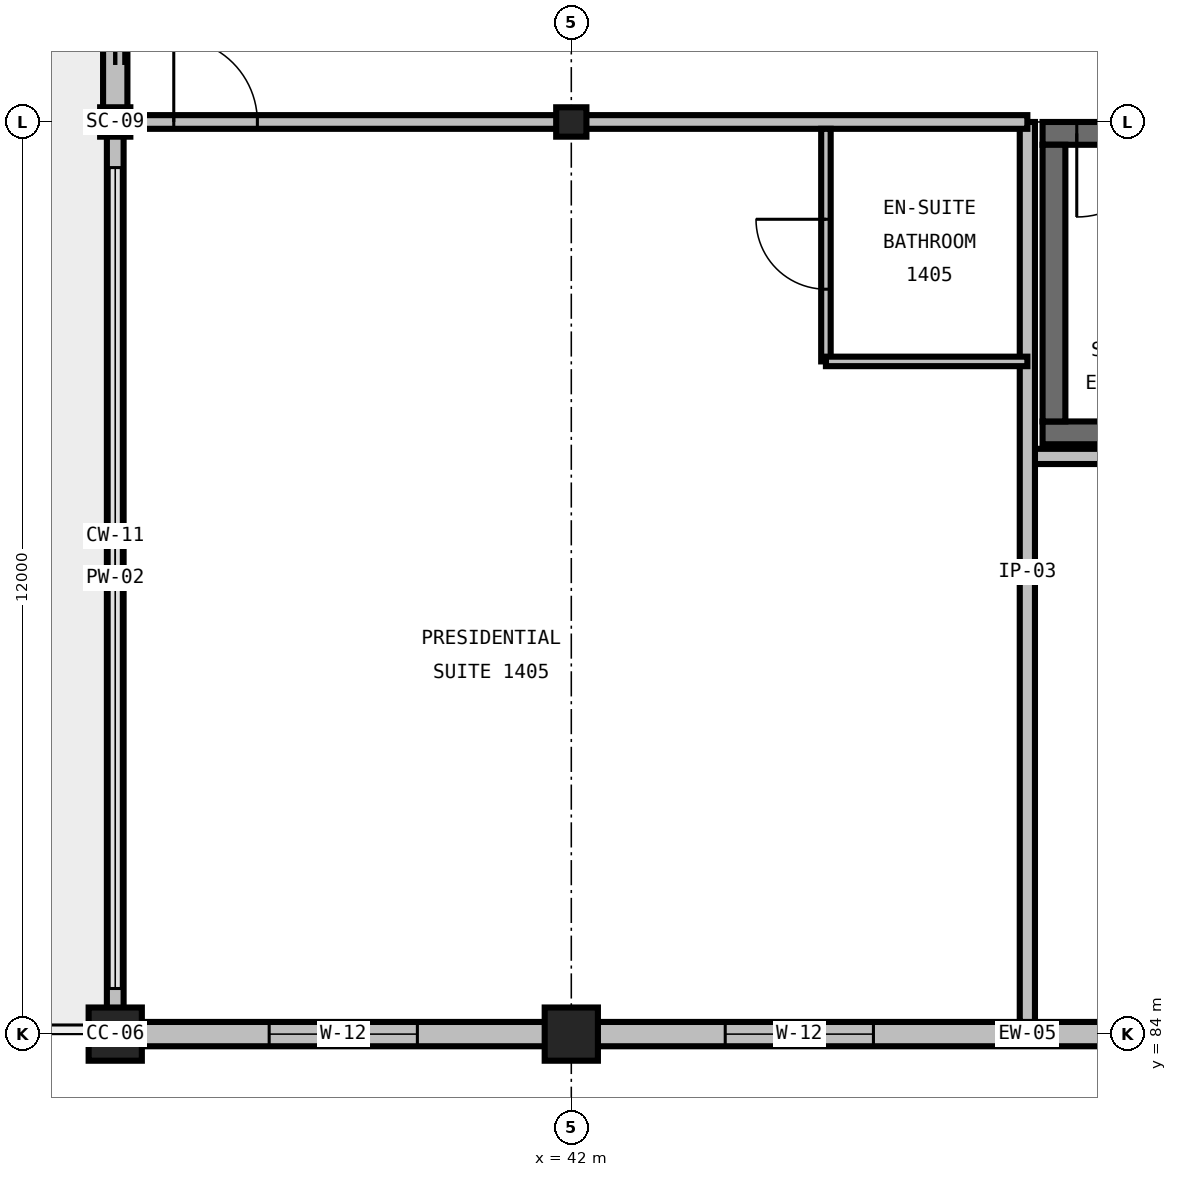
"""IFC4 building model, lengths in metres.
Left out: names, types, materials, properties, quantities, classifications, styles, units other than length and angle.
Written with IfcOpenShell. Run it as: python <this file> out.ifc"""

import sys

from ifc_helpers import new_model, si_unit, direction, frame, frame_2d, origin, origin_2d, place, context, subcontext, project, spatial, rectangle, i_section, extrude, element, fill, save


model = new_model("IFC4")
c1 = context("Model", 3, precision=1e-05, world=origin(), true_north=direction((0.0, 1.0)))
c2 = subcontext(c1, "Body", "Model", "MODEL_VIEW")
j1 = project(units=[si_unit("LENGTHUNIT", "METRE"), si_unit("PLANEANGLEUNIT", "RADIAN")], contexts=[c1])
p1 = place(None, origin())
s1 = spatial("IfcSite", under=j1, at=p1, CompositionType="ELEMENT")
p2 = place(p1, origin())
s2 = spatial("IfcBuilding", under=s1, at=p2, CompositionType="ELEMENT")
p3 = place(p2, frame((0.0, 0.0, 60.0)))
s3 = spatial("IfcBuildingStorey", under=s2, at=p3, CompositionType="ELEMENT", Elevation=60.0)
p4 = place(p3, frame((36.0, 84.0, 0.0), z_axis=(0.0, 0.0, 1.0), x_axis=(1.0, 0.0, 0.0)))
e1 = element("IfcColumn", 1, at=p4, inside=s3, PredefinedType="COLUMN", context=c2, shape_type="SweptSolid", body=[
    extrude(rectangle(XDim=0.7, YDim=0.7, at=origin_2d()), origin(), (0.0, 0.0, 1.0), 3.6),
])
p5 = place(p3, frame((36.0, 96.0, 0.0), z_axis=(0.0, 0.0, 1.0), x_axis=(1.0, 0.0, 0.0)))
e2 = element("IfcColumn", 2, at=p5, inside=s3, PredefinedType="COLUMN", context=c2, shape_type="SweptSolid", body=[
    extrude(i_section(OverallWidth=0.398, OverallDepth=0.387, WebThickness=0.021, FlangeThickness=0.033, FilletRadius=0.031, at=origin_2d()), origin(), (0.0, 0.0, 1.0), 3.6),
])
p6 = place(p3, frame((42.0, 84.0, 0.0), z_axis=(0.0, 0.0, 1.0), x_axis=(1.0, 0.0, 0.0)))
e3 = element("IfcColumn", 3, at=p6, inside=s3, PredefinedType="COLUMN", context=c2, shape_type="SweptSolid", body=[
    extrude(rectangle(XDim=0.7, YDim=0.7, at=origin_2d()), origin(), (0.0, 0.0, 1.0), 3.6),
])
p7 = place(p3, frame((42.0, 96.0, 0.0), z_axis=(0.0, 0.0, 1.0), x_axis=(1.0, 0.0, 0.0)))
e4 = element("IfcColumn", 4, at=p7, inside=s3, PredefinedType="COLUMN", context=c2, shape_type="SweptSolid", body=[
    extrude(i_section(OverallWidth=0.398, OverallDepth=0.387, WebThickness=0.021, FlangeThickness=0.033, FilletRadius=0.031, at=origin_2d()), origin(), (0.0, 0.0, 1.0), 3.6),
])
p8 = place(p3, frame((48.2, 91.91, 0.0), z_axis=(0.0, 0.0, 1.0), x_axis=(1.0, 0.0, 0.0)))
e5 = element("IfcWall", 5, at=p8, inside=s3, PredefinedType="SHEAR", context=c2, shape_type="SweptSolid", body=[
    extrude(rectangle(XDim=9.8, YDim=0.3, at=frame_2d((4.9, 0.0))), origin(), (0.0, 0.0, 1.0), 3.6),
])
p9 = place(p3, frame((58.0, 95.85, 0.0), z_axis=(0.0, 0.0, 1.0), x_axis=(-1.0, 0.0, 0.0)))
e6 = element("IfcWall", 6, at=p9, inside=s3, PredefinedType="SHEAR", context=c2, shape_type="SweptSolid", body=[
    extrude(rectangle(XDim=9.8, YDim=0.3, at=frame_2d((4.9, 0.0))), origin(), (0.0, 0.0, 1.0), 3.6),
])
p10 = place(p9, frame((8.25, 0.0, 0.0)))
e7 = element("IfcOpeningElement", 7, at=p10, cuts=e6, PredefinedType="OPENING", context=c2, shape_type="SweptSolid", body=[
    extrude(rectangle(XDim=1.1, YDim=2.2, at=frame_2d((0.55, 1.1))), frame((0.0, 0.165, 0.0), z_axis=(0.0, -1.0, 0.0), x_axis=(1.0, 0.0, 0.0)), (0.0, 0.0, 1.0), 0.33),
])
p11 = place(p3, frame((48.35, 95.7, 0.0), z_axis=(0.0, 0.0, 1.0), x_axis=(0.0, -1.0, 0.0)))
e8 = element("IfcWall", 8, at=p11, inside=s3, PredefinedType="SHEAR", context=c2, shape_type="SweptSolid", body=[
    extrude(rectangle(XDim=3.64, YDim=0.3, at=frame_2d((1.82, 0.0))), origin(), (0.0, 0.0, 1.0), 3.6),
])
p12 = place(p3, frame((36.0, 84.0, 0.0), z_axis=(0.0, 0.0, 1.0), x_axis=(1.0, 0.0, 0.0)))
e9 = element("IfcWall", 9, at=p12, inside=s3, PredefinedType="STANDARD", context=c2, shape_type="SweptSolid", body=[
    extrude(rectangle(XDim=6.0, YDim=0.32, at=frame_2d((3.0, 0.0))), origin(), (0.0, 0.0, 1.0), 2.536),
])
p13 = place(p12, frame((2.025, 0.0, 0.65)))
e10 = element("IfcOpeningElement", 10, at=p13, cuts=e9, PredefinedType="OPENING", context=c2, shape_type="SweptSolid", body=[
    extrude(rectangle(XDim=1.95, YDim=1.55, at=frame_2d((0.975, 0.775))), frame((0.0, 0.175, 0.0), z_axis=(0.0, -1.0, 0.0), x_axis=(1.0, 0.0, 0.0)), (0.0, 0.0, 1.0), 0.35),
])
p14 = place(p3, frame((42.0, 84.0, 0.0), z_axis=(0.0, 0.0, 1.0), x_axis=(1.0, 0.0, 0.0)))
e11 = element("IfcWall", 11, at=p14, inside=s3, PredefinedType="STANDARD", context=c2, shape_type="SweptSolid", body=[
    extrude(rectangle(XDim=12.0, YDim=0.32, at=frame_2d((6.0, 0.0))), origin(), (0.0, 0.0, 1.0), 2.536),
])
p15 = place(p14, frame((2.025, 0.0, 0.65)))
e12 = element("IfcOpeningElement", 12, at=p15, cuts=e11, PredefinedType="OPENING", context=c2, shape_type="SweptSolid", body=[
    extrude(rectangle(XDim=1.95, YDim=1.55, at=frame_2d((0.975, 0.775))), frame((0.0, 0.175, 0.0), z_axis=(0.0, -1.0, 0.0), x_axis=(1.0, 0.0, 0.0)), (0.0, 0.0, 1.0), 0.35),
])
p16 = place(p14, frame((8.025, 0.0, 0.65)))
e13 = element("IfcOpeningElement", 13, at=p16, cuts=e11, PredefinedType="OPENING", context=c2, shape_type="SweptSolid", body=[
    extrude(rectangle(XDim=1.95, YDim=1.55, at=frame_2d((0.975, 0.775))), frame((0.0, 0.175, 0.0), z_axis=(0.0, -1.0, 0.0), x_axis=(1.0, 0.0, 0.0)), (0.0, 0.0, 1.0), 0.35),
])
p17 = place(p3, frame((36.0, 96.0, 0.0), z_axis=(0.0, 0.0, 1.0), x_axis=(0.0, -1.0, 0.0)))
e14 = element("IfcWall", 14, at=p17, inside=s3, PredefinedType="PARAPET", context=c2, shape_type="SweptSolid", body=[
    extrude(rectangle(XDim=12.0, YDim=0.22, at=frame_2d((6.0, 0.0))), origin(), (0.0, 0.0, 1.0), 0.2),
])
p18 = place(p3, frame((36.0, 105.0, 0.0), z_axis=(0.0, 0.0, 1.0), x_axis=(0.0, -1.0, 0.0)))
e15 = element("IfcWall", 15, at=p18, inside=s3, PredefinedType="STANDARD", context=c2, shape_type="SweptSolid", body=[
    extrude(rectangle(XDim=9.0, YDim=0.32, at=frame_2d((4.5, 0.0))), origin(), (0.0, 0.0, 1.0), 2.981),
])
p19 = place(p18, frame((6.75, 0.0, 0.0)))
e16 = element("IfcOpeningElement", 16, at=p19, cuts=e15, PredefinedType="OPENING", context=c2, shape_type="SweptSolid", body=[
    extrude(rectangle(XDim=1.5, YDim=2.15, at=frame_2d((0.75, 1.075))), frame((0.0, 0.175, 0.0), z_axis=(0.0, -1.0, 0.0), x_axis=(1.0, 0.0, 0.0)), (0.0, 0.0, 1.0), 0.35),
])
p20 = place(p3, frame((48.0, 91.6, 0.0), z_axis=(0.0, 0.0, 1.0), x_axis=(1.0, 0.0, 0.0)))
e17 = element("IfcWall", 17, at=p20, inside=s3, PredefinedType="PARTITIONING", context=c2, shape_type="SweptSolid", body=[
    extrude(rectangle(XDim=10.4, YDim=0.2, at=frame_2d((5.2, 0.0))), origin(), (0.0, 0.0, 1.0), 3.29),
])
p21 = place(p3, frame((48.0, 84.16, 0.0), z_axis=(0.0, 0.0, 1.0), x_axis=(0.0, 1.0, 0.0)))
e18 = element("IfcWall", 18, at=p21, inside=s3, PredefinedType="PARTITIONING", context=c2, shape_type="SweptSolid", body=[
    extrude(rectangle(XDim=11.84, YDim=0.2, at=frame_2d((5.92, 0.0))), origin(), (0.0, 0.0, 1.0), 3.29),
])
p22 = place(p3, frame((36.085, 96.0, 0.0), z_axis=(0.0, 0.0, 1.0), x_axis=(1.0, 0.0, 0.0)))
e19 = element("IfcWall", 19, at=p22, inside=s3, PredefinedType="PARTITIONING", context=c2, shape_type="SweptSolid", body=[
    extrude(rectangle(XDim=11.915, YDim=0.18, at=frame_2d((5.957, 0.0))), origin(), (0.0, 0.0, 1.0), 2.359),
])
p23 = place(p22, frame((0.685, 0.0, 0.0)))
e20 = element("IfcOpeningElement", 20, at=p23, cuts=e19, PredefinedType="OPENING", context=c2, shape_type="SweptSolid", body=[
    extrude(rectangle(XDim=1.1, YDim=2.2, at=frame_2d((0.55, 1.1))), frame((0.0, 0.105, 0.0), z_axis=(0.0, -1.0, 0.0), x_axis=(1.0, 0.0, 0.0)), (0.0, 0.0, 1.0), 0.21),
])
p24 = place(p3, frame((45.35, 92.85, 0.0), z_axis=(0.0, 0.0, 1.0), x_axis=(0.0, 1.0, 0.0)))
e21 = element("IfcWall", 21, at=p24, inside=s3, PredefinedType="PARTITIONING", context=c2, shape_type="SweptSolid", body=[
    extrude(rectangle(XDim=3.06, YDim=0.125, at=frame_2d((1.53, 0.0))), origin(), (0.0, 0.0, 1.0), 3.29),
])
p25 = place(p24, frame((0.95, 0.0, 0.0)))
e22 = element("IfcOpeningElement", 22, at=p25, cuts=e21, PredefinedType="OPENING", context=c2, shape_type="SweptSolid", body=[
    extrude(rectangle(XDim=0.92, YDim=2.1, at=frame_2d((0.46, 1.05))), frame((0.0, 0.077, 0.0), z_axis=(0.0, -1.0, 0.0), x_axis=(1.0, 0.0, 0.0)), (0.0, 0.0, 1.0), 0.155),
])
p26 = place(p3, frame((45.35, 92.85, 0.0), z_axis=(0.0, 0.0, 1.0), x_axis=(1.0, 0.0, 0.0)))
e23 = element("IfcWall", 23, at=p26, inside=s3, PredefinedType="PARTITIONING", context=c2, shape_type="SweptSolid", body=[
    extrude(rectangle(XDim=2.65, YDim=0.125, at=frame_2d((1.325, 0.0))), origin(), (0.0, 0.0, 1.0), 3.29),
])
p27 = place(p10, origin())
e24 = element("IfcDoor", 24, at=p27, inside=s3, OperationType="SINGLE_SWING_RIGHT", PredefinedType="DOOR", context=c2, shape_type="SweptSolid", body=[
    extrude(rectangle(XDim=1.1, YDim=2.2, at=frame_2d((0.55, 1.1))), frame((0.0, 0.025, 0.0), z_axis=(0.0, -1.0, 0.0), x_axis=(1.0, 0.0, 0.0)), (0.0, 0.0, 1.0), 0.05),
])
fill(e7, e24)
p28 = place(p13, origin())
e25 = element("IfcWindow", 25, at=p28, inside=s3, PartitioningType="DOUBLE_PANEL_VERTICAL", PredefinedType="WINDOW", context=c2, shape_type="SweptSolid", body=[
    extrude(rectangle(XDim=1.95, YDim=1.55, at=frame_2d((0.975, 0.775))), frame((0.0, 0.03, 0.0), z_axis=(0.0, -1.0, 0.0), x_axis=(1.0, 0.0, 0.0)), (0.0, 0.0, 1.0), 0.06),
])
fill(e10, e25)
p29 = place(p15, origin())
e26 = element("IfcWindow", 26, at=p29, inside=s3, PartitioningType="DOUBLE_PANEL_VERTICAL", PredefinedType="WINDOW", context=c2, shape_type="SweptSolid", body=[
    extrude(rectangle(XDim=1.95, YDim=1.55, at=frame_2d((0.975, 0.775))), frame((0.0, 0.03, 0.0), z_axis=(0.0, -1.0, 0.0), x_axis=(1.0, 0.0, 0.0)), (0.0, 0.0, 1.0), 0.06),
])
fill(e12, e26)
p30 = place(p19, origin())
e27 = element("IfcDoor", 27, at=p30, inside=s3, OperationType="DOUBLE_DOOR_SLIDING", PredefinedType="DOOR", context=c2, shape_type="SweptSolid", body=[
    extrude(rectangle(XDim=1.5, YDim=2.15, at=frame_2d((0.75, 1.075))), frame((0.0, 0.025, 0.0), z_axis=(0.0, -1.0, 0.0), x_axis=(1.0, 0.0, 0.0)), (0.0, 0.0, 1.0), 0.05),
])
fill(e16, e27)
p31 = place(p23, origin())
e28 = element("IfcDoor", 28, at=p31, inside=s3, OperationType="SINGLE_SWING_LEFT", PredefinedType="DOOR", context=c2, shape_type="SweptSolid", body=[
    extrude(rectangle(XDim=1.1, YDim=2.2, at=frame_2d((0.55, 1.1))), frame((0.0, 0.025, 0.0), z_axis=(0.0, -1.0, 0.0), x_axis=(1.0, 0.0, 0.0)), (0.0, 0.0, 1.0), 0.05),
])
fill(e20, e28)
p32 = place(p25, origin())
e29 = element("IfcDoor", 29, at=p32, inside=s3, OperationType="SINGLE_SWING_RIGHT", PredefinedType="DOOR", context=c2, shape_type="SweptSolid", body=[
    extrude(rectangle(XDim=0.92, YDim=2.1, at=frame_2d((0.46, 1.05))), frame((0.0, 0.025, 0.0), z_axis=(0.0, -1.0, 0.0), x_axis=(1.0, 0.0, 0.0)), (0.0, 0.0, 1.0), 0.05),
])
fill(e22, e29)
save(model, sys.argv[1])
